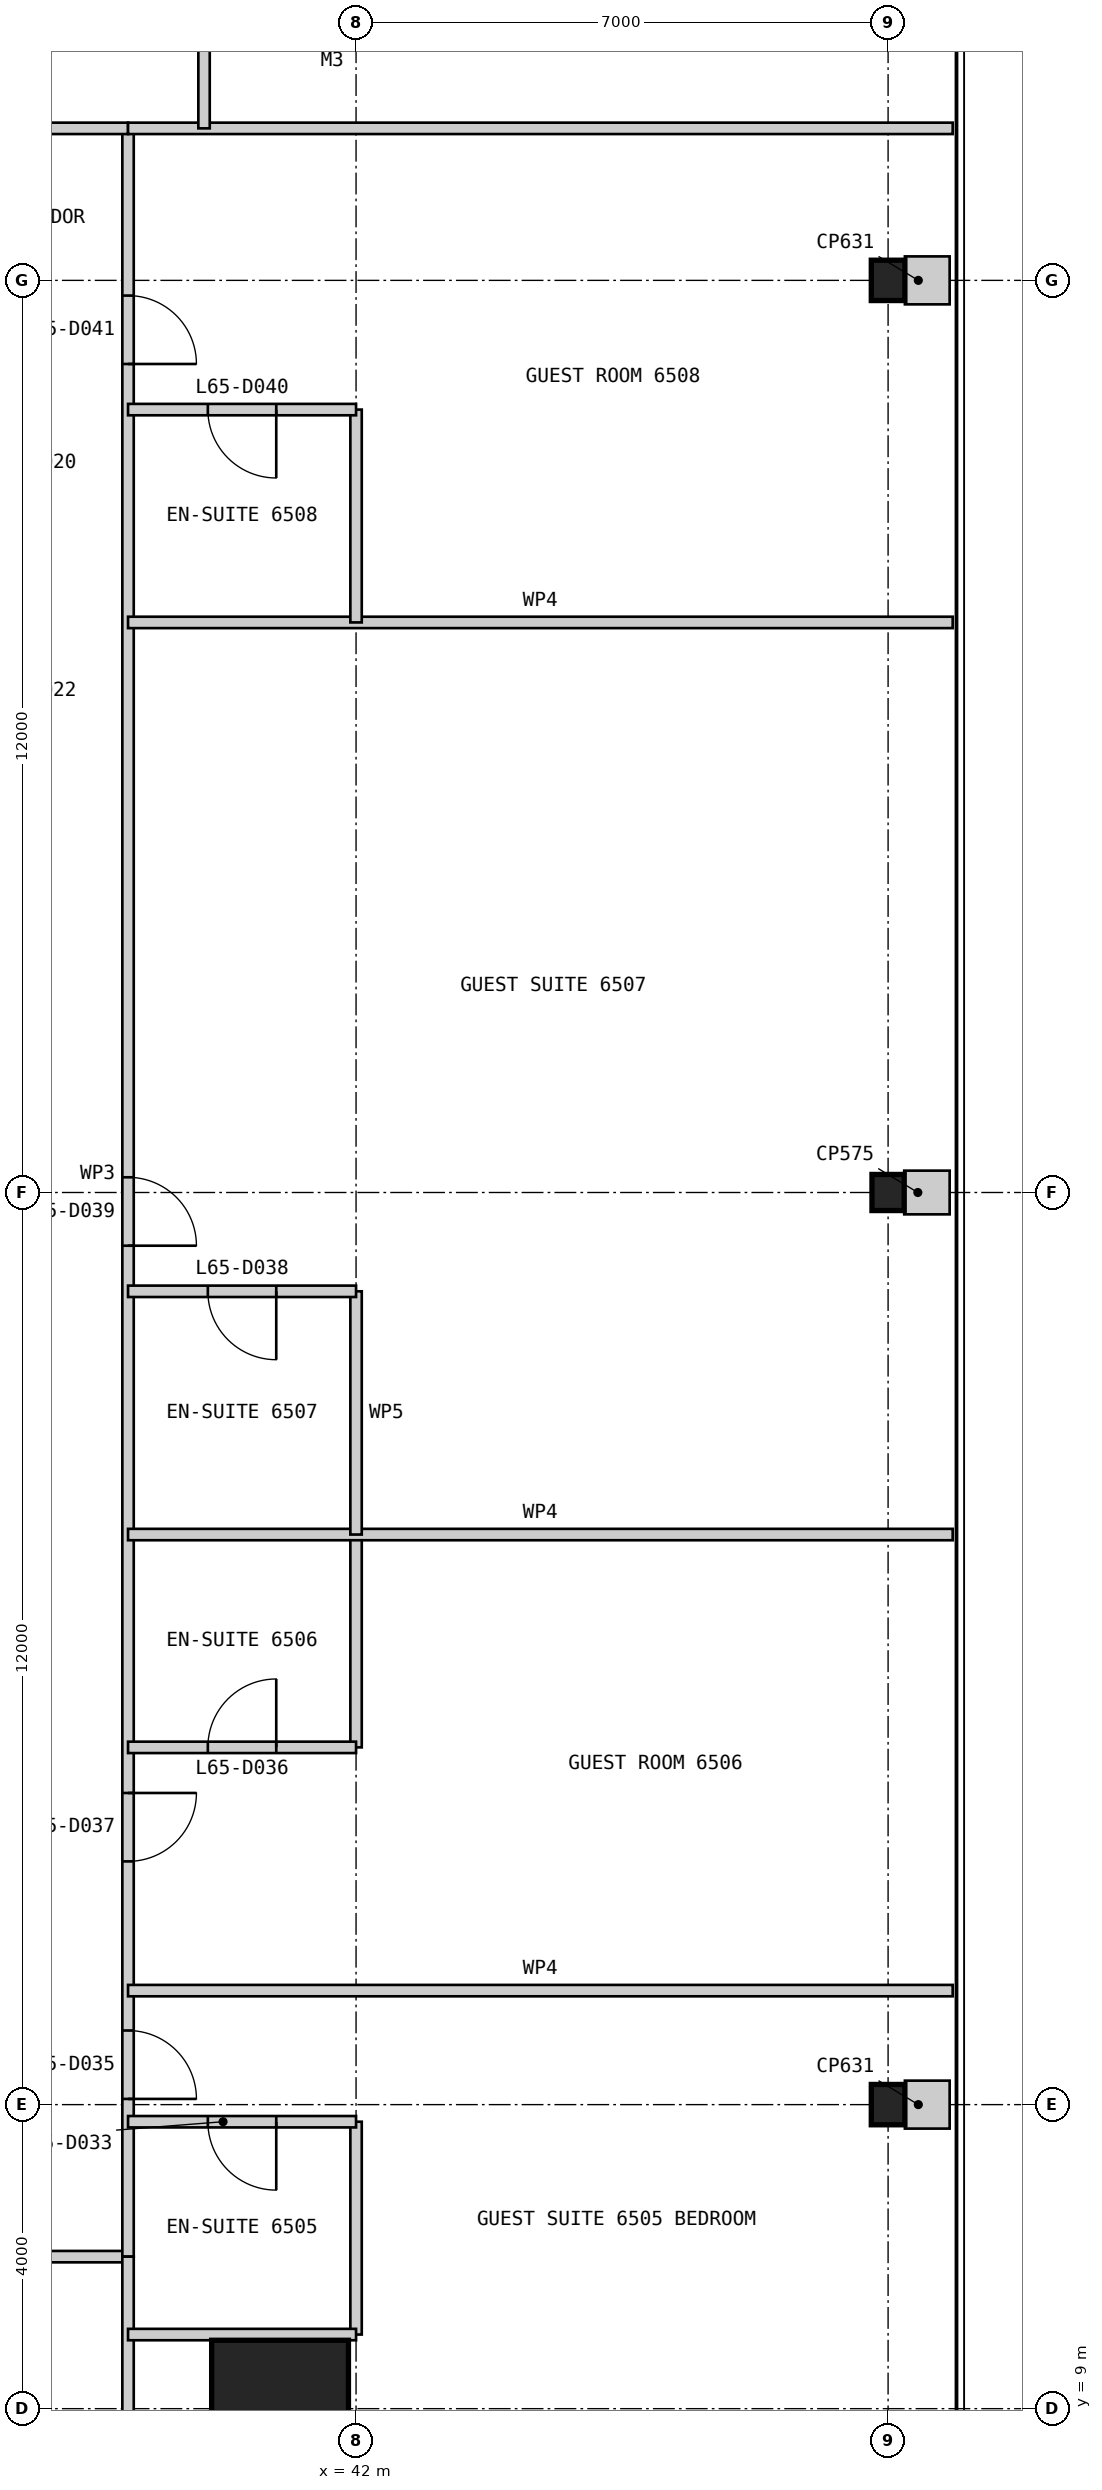
"""IFC4 building model, lengths in metres.
Left out: names, types, materials, properties, quantities, classifications, styles, units other than length and angle.
Written with IfcOpenShell. Run it as: python <this file> out.ifc"""

import sys

from ifc_helpers import new_model, si_unit, direction, frame, frame_2d, origin, origin_2d, place, context, subcontext, project, spatial, rectangle, i_section, extrude, element, fill, save


model = new_model("IFC4")
c1 = context("Model", 3, precision=1e-05, world=origin(), true_north=direction((0.0, 1.0)))
c2 = subcontext(c1, "Body", "Model", "MODEL_VIEW")
j1 = project(units=[si_unit("LENGTHUNIT", "METRE"), si_unit("PLANEANGLEUNIT", "RADIAN")], contexts=[c1])
p1 = place(None, origin())
s1 = spatial("IfcSite", under=j1, at=p1, CompositionType="ELEMENT")
p2 = place(p1, origin())
s2 = spatial("IfcBuilding", under=s1, at=p2, CompositionType="ELEMENT")
p3 = place(p2, frame((0.0, 0.0, 273.0)))
s3 = spatial("IfcBuildingStorey", under=s2, at=p3, CompositionType="ELEMENT", Elevation=273.0)
p4 = place(p3, frame((41.0, 9.0, 0.0), z_axis=(0.0, 0.0, 1.0), x_axis=(1.0, 0.0, 0.0)))
e1 = element("IfcColumn", 1, at=p4, inside=s3, PredefinedType="COLUMN", context=c2, shape_type="SweptSolid", body=[
    extrude(rectangle(XDim=1.8, YDim=1.8, at=origin_2d()), origin(), (0.0, 0.0, 1.0), 3.4),
])
p5 = place(p3, frame((49.0, 13.0, 0.0), z_axis=(0.0, 0.0, 1.0), x_axis=(1.0, 0.0, 0.0)))
e2 = element("IfcColumn", 2, at=p5, inside=s3, PredefinedType="COLUMN", context=c2, shape_type="SweptSolid", body=[
    extrude(i_section(OverallWidth=0.442, OverallDepth=0.531, WebThickness=0.066, FlangeThickness=0.106, at=origin_2d()), origin(), (0.0, 0.0, 1.0), 3.4),
])
p6 = place(p3, frame((49.0, 25.0, 0.0), z_axis=(0.0, 0.0, 1.0), x_axis=(1.0, 0.0, 0.0)))
e3 = element("IfcColumn", 3, at=p6, inside=s3, PredefinedType="COLUMN", context=c2, shape_type="SweptSolid", body=[
    extrude(i_section(OverallWidth=0.424, OverallDepth=0.475, WebThickness=0.048, FlangeThickness=0.077, at=origin_2d()), origin(), (0.0, 0.0, 1.0), 3.4),
])
p7 = place(p3, frame((49.0, 37.0, 0.0), z_axis=(0.0, 0.0, 1.0), x_axis=(1.0, 0.0, 0.0)))
e4 = element("IfcColumn", 4, at=p7, inside=s3, PredefinedType="COLUMN", context=c2, shape_type="SweptSolid", body=[
    extrude(i_section(OverallWidth=0.442, OverallDepth=0.531, WebThickness=0.066, FlangeThickness=0.106, at=origin_2d()), origin(), (0.0, 0.0, 1.0), 3.4),
])
p8 = place(p3, frame((11.0, 11.0, 0.0), z_axis=(0.0, 0.0, 1.0), x_axis=(1.0, 0.0, 0.0)))
e5 = element("IfcWall", 5, at=p8, inside=s3, PredefinedType="PARTITIONING", context=c2, shape_type="SweptSolid", body=[
    extrude(rectangle(XDim=28.0, YDim=0.15, at=frame_2d((14.0, 0.0))), origin(), (0.0, 0.0, 1.0), 2.844),
])
p9 = place(p8, frame((1.9, 0.0, 0.0)))
e6 = element("IfcOpeningElement", 6, at=p9, cuts=e5, PredefinedType="OPENING", context=c2, shape_type="SweptSolid", body=[
    extrude(rectangle(XDim=0.9, YDim=2.1, at=frame_2d((0.45, 1.05))), frame((0.0, 0.085, 0.0), z_axis=(0.0, -1.0, 0.0), x_axis=(1.0, 0.0, 0.0)), (0.0, 0.0, 1.0), 0.17),
])
p10 = place(p8, frame((4.7, 0.0, 0.0)))
e7 = element("IfcOpeningElement", 7, at=p10, cuts=e5, PredefinedType="OPENING", context=c2, shape_type="SweptSolid", body=[
    extrude(rectangle(XDim=1.0, YDim=2.1, at=frame_2d((0.5, 1.05))), frame((0.0, 0.085, 0.0), z_axis=(0.0, -1.0, 0.0), x_axis=(1.0, 0.0, 0.0)), (0.0, 0.0, 1.0), 0.17),
])
p11 = place(p8, frame((13.3, 0.0, 0.0)))
e8 = element("IfcOpeningElement", 8, at=p11, cuts=e5, PredefinedType="OPENING", context=c2, shape_type="SweptSolid", body=[
    extrude(rectangle(XDim=0.9, YDim=2.1, at=frame_2d((0.45, 1.05))), frame((0.0, 0.085, 0.0), z_axis=(0.0, -1.0, 0.0), x_axis=(1.0, 0.0, 0.0)), (0.0, 0.0, 1.0), 0.17),
])
p12 = place(p8, frame((24.9, 0.0, 0.0)))
e9 = element("IfcOpeningElement", 9, at=p12, cuts=e5, PredefinedType="OPENING", context=c2, shape_type="SweptSolid", body=[
    extrude(rectangle(XDim=0.9, YDim=2.1, at=frame_2d((0.45, 1.05))), frame((0.0, 0.085, 0.0), z_axis=(0.0, -1.0, 0.0), x_axis=(1.0, 0.0, 0.0)), (0.0, 0.0, 1.0), 0.17),
])
p13 = place(p3, frame((39.0, 11.0, 0.0), z_axis=(0.0, 0.0, 1.0), x_axis=(0.0, 1.0, 0.0)))
e10 = element("IfcWall", 10, at=p13, inside=s3, PredefinedType="PARTITIONING", context=c2, shape_type="SweptSolid", body=[
    extrude(rectangle(XDim=28.0, YDim=0.15, at=frame_2d((14.0, 0.0))), origin(), (0.0, 0.0, 1.0), 2.844),
])
p14 = place(p13, frame((2.075, 0.0, 0.0)))
e11 = element("IfcOpeningElement", 11, at=p14, cuts=e10, PredefinedType="OPENING", context=c2, shape_type="SweptSolid", body=[
    extrude(rectangle(XDim=0.9, YDim=2.1, at=frame_2d((0.45, 1.05))), frame((0.0, 0.085, 0.0), z_axis=(0.0, -1.0, 0.0), x_axis=(1.0, 0.0, 0.0)), (0.0, 0.0, 1.0), 0.17),
])
p15 = place(p13, frame((5.2, 0.0, 0.0)))
e12 = element("IfcOpeningElement", 12, at=p15, cuts=e10, PredefinedType="OPENING", context=c2, shape_type="SweptSolid", body=[
    extrude(rectangle(XDim=0.9, YDim=2.1, at=frame_2d((0.45, 1.05))), frame((0.0, 0.085, 0.0), z_axis=(0.0, -1.0, 0.0), x_axis=(1.0, 0.0, 0.0)), (0.0, 0.0, 1.0), 0.17),
])
p16 = place(p13, frame((13.3, 0.0, 0.0)))
e13 = element("IfcOpeningElement", 13, at=p16, cuts=e10, PredefinedType="OPENING", context=c2, shape_type="SweptSolid", body=[
    extrude(rectangle(XDim=0.9, YDim=2.1, at=frame_2d((0.45, 1.05))), frame((0.0, 0.085, 0.0), z_axis=(0.0, -1.0, 0.0), x_axis=(1.0, 0.0, 0.0)), (0.0, 0.0, 1.0), 0.17),
])
p17 = place(p13, frame((24.9, 0.0, 0.0)))
e14 = element("IfcOpeningElement", 14, at=p17, cuts=e10, PredefinedType="OPENING", context=c2, shape_type="SweptSolid", body=[
    extrude(rectangle(XDim=0.9, YDim=2.1, at=frame_2d((0.45, 1.05))), frame((0.0, 0.085, 0.0), z_axis=(0.0, -1.0, 0.0), x_axis=(1.0, 0.0, 0.0)), (0.0, 0.0, 1.0), 0.17),
])
p18 = place(p3, frame((39.0, 0.15, 0.0), z_axis=(0.0, 0.0, 1.0), x_axis=(0.0, 1.0, 0.0)))
e15 = element("IfcWall", 15, at=p18, inside=s3, PredefinedType="PARTITIONING", context=c2, shape_type="SweptSolid", body=[
    extrude(rectangle(XDim=10.85, YDim=0.15, at=frame_2d((5.425, 0.0))), origin(), (0.0, 0.0, 1.0), 2.844),
])
p19 = place(p3, frame((42.0, 9.975, 0.0), z_axis=(0.0, 0.0, 1.0), x_axis=(0.0, 1.0, 0.0)))
e16 = element("IfcWall", 16, at=p19, inside=s3, PredefinedType="PARTITIONING", context=c2, shape_type="SweptSolid", body=[
    extrude(rectangle(XDim=2.8, YDim=0.15, at=frame_2d((1.4, 0.0))), origin(), (0.0, 0.0, 1.0), 3.25),
])
p20 = place(p3, frame((42.0, 12.775, 0.0), z_axis=(0.0, 0.0, 1.0), x_axis=(-1.0, 0.0, 0.0)))
e17 = element("IfcWall", 17, at=p20, inside=s3, PredefinedType="PARTITIONING", context=c2, shape_type="SweptSolid", body=[
    extrude(rectangle(XDim=3.0, YDim=0.15, at=frame_2d((1.5, 0.0))), origin(), (0.0, 0.0, 1.0), 3.25),
])
p21 = place(p20, frame((1.05, 0.0, 0.0)))
e18 = element("IfcOpeningElement", 18, at=p21, cuts=e17, PredefinedType="OPENING", context=c2, shape_type="SweptSolid", body=[
    extrude(rectangle(XDim=0.9, YDim=2.1, at=frame_2d((0.45, 1.05))), frame((0.0, 0.085, 0.0), z_axis=(0.0, -1.0, 0.0), x_axis=(1.0, 0.0, 0.0)), (0.0, 0.0, 1.0), 0.17),
])
p22 = place(p3, frame((42.0, 9.975, 0.0), z_axis=(0.0, 0.0, 1.0), x_axis=(-1.0, 0.0, 0.0)))
e19 = element("IfcWall", 19, at=p22, inside=s3, PredefinedType="PARTITIONING", context=c2, shape_type="SweptSolid", body=[
    extrude(rectangle(XDim=3.0, YDim=0.15, at=frame_2d((1.5, 0.0))), origin(), (0.0, 0.0, 1.0), 3.25),
])
p23 = place(p3, frame((49.85, 14.5, 0.0), z_axis=(0.0, 0.0, 1.0), x_axis=(-1.0, 0.0, 0.0)))
e20 = element("IfcWall", 20, at=p23, inside=s3, PredefinedType="PARTITIONING", context=c2, shape_type="SweptSolid", body=[
    extrude(rectangle(XDim=10.85, YDim=0.15, at=frame_2d((5.425, 0.0))), origin(), (0.0, 0.0, 1.0), 3.25),
])
p24 = place(p3, frame((42.0, 17.7, 0.0), z_axis=(0.0, 0.0, 1.0), x_axis=(0.0, 1.0, 0.0)))
e21 = element("IfcWall", 21, at=p24, inside=s3, PredefinedType="PARTITIONING", context=c2, shape_type="SweptSolid", body=[
    extrude(rectangle(XDim=2.8, YDim=0.15, at=frame_2d((1.4, 0.0))), origin(), (0.0, 0.0, 1.0), 3.25),
])
p25 = place(p3, frame((42.0, 17.7, 0.0), z_axis=(0.0, 0.0, 1.0), x_axis=(-1.0, 0.0, 0.0)))
e22 = element("IfcWall", 22, at=p25, inside=s3, PredefinedType="PARTITIONING", context=c2, shape_type="SweptSolid", body=[
    extrude(rectangle(XDim=3.0, YDim=0.15, at=frame_2d((1.5, 0.0))), origin(), (0.0, 0.0, 1.0), 3.25),
])
p26 = place(p25, frame((1.05, 0.0, 0.0)))
e23 = element("IfcOpeningElement", 23, at=p26, cuts=e22, PredefinedType="OPENING", context=c2, shape_type="SweptSolid", body=[
    extrude(rectangle(XDim=0.9, YDim=2.1, at=frame_2d((0.45, 1.05))), frame((0.0, 0.085, 0.0), z_axis=(0.0, -1.0, 0.0), x_axis=(1.0, 0.0, 0.0)), (0.0, 0.0, 1.0), 0.17),
])
p27 = place(p3, frame((49.85, 20.5, 0.0), z_axis=(0.0, 0.0, 1.0), x_axis=(-1.0, 0.0, 0.0)))
e24 = element("IfcWall", 24, at=p27, inside=s3, PredefinedType="PARTITIONING", context=c2, shape_type="SweptSolid", body=[
    extrude(rectangle(XDim=10.85, YDim=0.15, at=frame_2d((5.425, 0.0))), origin(), (0.0, 0.0, 1.0), 3.25),
])
p28 = place(p3, frame((42.0, 20.5, 0.0), z_axis=(0.0, 0.0, 1.0), x_axis=(0.0, 1.0, 0.0)))
e25 = element("IfcWall", 25, at=p28, inside=s3, PredefinedType="PARTITIONING", context=c2, shape_type="SweptSolid", body=[
    extrude(rectangle(XDim=3.2, YDim=0.15, at=frame_2d((1.6, 0.0))), origin(), (0.0, 0.0, 1.0), 3.25),
])
p29 = place(p3, frame((42.0, 23.7, 0.0), z_axis=(0.0, 0.0, 1.0), x_axis=(-1.0, 0.0, 0.0)))
e26 = element("IfcWall", 26, at=p29, inside=s3, PredefinedType="PARTITIONING", context=c2, shape_type="SweptSolid", body=[
    extrude(rectangle(XDim=3.0, YDim=0.15, at=frame_2d((1.5, 0.0))), origin(), (0.0, 0.0, 1.0), 3.25),
])
p30 = place(p29, frame((1.05, 0.0, 0.0)))
e27 = element("IfcOpeningElement", 27, at=p30, cuts=e26, PredefinedType="OPENING", context=c2, shape_type="SweptSolid", body=[
    extrude(rectangle(XDim=0.9, YDim=2.1, at=frame_2d((0.45, 1.05))), frame((0.0, 0.085, 0.0), z_axis=(0.0, -1.0, 0.0), x_axis=(1.0, 0.0, 0.0)), (0.0, 0.0, 1.0), 0.17),
])
p31 = place(p3, frame((49.85, 32.5, 0.0), z_axis=(0.0, 0.0, 1.0), x_axis=(-1.0, 0.0, 0.0)))
e28 = element("IfcWall", 28, at=p31, inside=s3, PredefinedType="PARTITIONING", context=c2, shape_type="SweptSolid", body=[
    extrude(rectangle(XDim=10.85, YDim=0.15, at=frame_2d((5.425, 0.0))), origin(), (0.0, 0.0, 1.0), 3.25),
])
p32 = place(p3, frame((42.0, 32.5, 0.0), z_axis=(0.0, 0.0, 1.0), x_axis=(0.0, 1.0, 0.0)))
e29 = element("IfcWall", 29, at=p32, inside=s3, PredefinedType="PARTITIONING", context=c2, shape_type="SweptSolid", body=[
    extrude(rectangle(XDim=2.8, YDim=0.15, at=frame_2d((1.4, 0.0))), origin(), (0.0, 0.0, 1.0), 3.25),
])
p33 = place(p3, frame((42.0, 35.3, 0.0), z_axis=(0.0, 0.0, 1.0), x_axis=(-1.0, 0.0, 0.0)))
e30 = element("IfcWall", 30, at=p33, inside=s3, PredefinedType="PARTITIONING", context=c2, shape_type="SweptSolid", body=[
    extrude(rectangle(XDim=3.0, YDim=0.15, at=frame_2d((1.5, 0.0))), origin(), (0.0, 0.0, 1.0), 3.25),
])
p34 = place(p33, frame((1.05, 0.0, 0.0)))
e31 = element("IfcOpeningElement", 31, at=p34, cuts=e30, PredefinedType="OPENING", context=c2, shape_type="SweptSolid", body=[
    extrude(rectangle(XDim=0.9, YDim=2.1, at=frame_2d((0.45, 1.05))), frame((0.0, 0.085, 0.0), z_axis=(0.0, -1.0, 0.0), x_axis=(1.0, 0.0, 0.0)), (0.0, 0.0, 1.0), 0.17),
])
p35 = place(p3, frame((39.0, 39.0, 0.0), z_axis=(0.0, 0.0, 1.0), x_axis=(-1.0, 0.0, 0.0)))
e32 = element("IfcWall", 32, at=p35, inside=s3, PredefinedType="PARTITIONING", context=c2, shape_type="SweptSolid", body=[
    extrude(rectangle(XDim=28.0, YDim=0.15, at=frame_2d((14.0, 0.0))), origin(), (0.0, 0.0, 1.0), 2.844),
])
p36 = place(p35, frame((1.9, 0.0, 0.0)))
e33 = element("IfcOpeningElement", 33, at=p36, cuts=e32, PredefinedType="OPENING", context=c2, shape_type="SweptSolid", body=[
    extrude(rectangle(XDim=0.9, YDim=2.1, at=frame_2d((0.45, 1.05))), frame((0.0, 0.085, 0.0), z_axis=(0.0, -1.0, 0.0), x_axis=(1.0, 0.0, 0.0)), (0.0, 0.0, 1.0), 0.17),
])
p37 = place(p35, frame((5.2, 0.0, 0.0)))
e34 = element("IfcOpeningElement", 34, at=p37, cuts=e32, PredefinedType="OPENING", context=c2, shape_type="SweptSolid", body=[
    extrude(rectangle(XDim=0.9, YDim=2.1, at=frame_2d((0.45, 1.05))), frame((0.0, 0.085, 0.0), z_axis=(0.0, -1.0, 0.0), x_axis=(1.0, 0.0, 0.0)), (0.0, 0.0, 1.0), 0.17),
])
p38 = place(p35, frame((13.3, 0.0, 0.0)))
e35 = element("IfcOpeningElement", 35, at=p38, cuts=e32, PredefinedType="OPENING", context=c2, shape_type="SweptSolid", body=[
    extrude(rectangle(XDim=0.9, YDim=2.1, at=frame_2d((0.45, 1.05))), frame((0.0, 0.085, 0.0), z_axis=(0.0, -1.0, 0.0), x_axis=(1.0, 0.0, 0.0)), (0.0, 0.0, 1.0), 0.17),
])
p39 = place(p35, frame((24.9, 0.0, 0.0)))
e36 = element("IfcOpeningElement", 36, at=p39, cuts=e32, PredefinedType="OPENING", context=c2, shape_type="SweptSolid", body=[
    extrude(rectangle(XDim=0.9, YDim=2.1, at=frame_2d((0.45, 1.05))), frame((0.0, 0.085, 0.0), z_axis=(0.0, -1.0, 0.0), x_axis=(1.0, 0.0, 0.0)), (0.0, 0.0, 1.0), 0.17),
])
p40 = place(p3, frame((49.85, 39.0, 0.0), z_axis=(0.0, 0.0, 1.0), x_axis=(-1.0, 0.0, 0.0)))
e37 = element("IfcWall", 37, at=p40, inside=s3, PredefinedType="PARTITIONING", context=c2, shape_type="SweptSolid", body=[
    extrude(rectangle(XDim=10.85, YDim=0.15, at=frame_2d((5.425, 0.0))), origin(), (0.0, 0.0, 1.0), 2.844),
])
p41 = place(p3, frame((40.0, 41.6, 0.0), z_axis=(0.0, 0.0, 1.0), x_axis=(0.0, -1.0, 0.0)))
e38 = element("IfcWall", 38, at=p41, inside=s3, PredefinedType="PARTITIONING", context=c2, shape_type="SweptSolid", body=[
    extrude(rectangle(XDim=2.6, YDim=0.15, at=frame_2d((1.3, 0.0))), origin(), (0.0, 0.0, 1.0), 3.25),
])
p42 = place(p3, frame((49.81, 13.0, 0.0), z_axis=(0.0, 0.0, 1.0), x_axis=(-1.0, 0.0, 0.0)))
e39 = element("IfcWall", 39, at=p42, inside=s3, PredefinedType="PARTITIONING", context=c2, shape_type="SweptSolid", body=[
    extrude(rectangle(XDim=0.589, YDim=0.631, at=frame_2d((0.294, 0.0))), origin(), (0.0, 0.0, 1.0), 3.25),
])
p43 = place(p3, frame((49.81, 25.0, 0.0), z_axis=(0.0, 0.0, 1.0), x_axis=(-1.0, 0.0, 0.0)))
e40 = element("IfcWall", 40, at=p43, inside=s3, PredefinedType="PARTITIONING", context=c2, shape_type="SweptSolid", body=[
    extrude(rectangle(XDim=0.598, YDim=0.575, at=frame_2d((0.299, 0.0))), origin(), (0.0, 0.0, 1.0), 3.25),
])
p44 = place(p3, frame((49.81, 37.0, 0.0), z_axis=(0.0, 0.0, 1.0), x_axis=(-1.0, 0.0, 0.0)))
e41 = element("IfcWall", 41, at=p44, inside=s3, PredefinedType="PARTITIONING", context=c2, shape_type="SweptSolid", body=[
    extrude(rectangle(XDim=0.589, YDim=0.631, at=frame_2d((0.294, 0.0))), origin(), (0.0, 0.0, 1.0), 3.25),
])
p45 = place(p21, origin())
e42 = element("IfcDoor", 42, at=p45, inside=s3, OperationType="SINGLE_SWING_LEFT", PredefinedType="DOOR", context=c2, shape_type="SweptSolid", body=[
    extrude(rectangle(XDim=0.9, YDim=2.1, at=frame_2d((0.45, 1.05))), frame((0.0, 0.025, 0.0), z_axis=(0.0, -1.0, 0.0), x_axis=(1.0, 0.0, 0.0)), (0.0, 0.0, 1.0), 0.05),
])
fill(e18, e42)
p46 = place(p14, frame((0.9, 0.0, 0.0), z_axis=(0.0, 0.0, 1.0), x_axis=(-1.0, 0.0, 0.0)))
e43 = element("IfcDoor", 43, at=p46, inside=s3, OperationType="SINGLE_SWING_RIGHT", PredefinedType="DOOR", context=c2, shape_type="SweptSolid", body=[
    extrude(rectangle(XDim=0.9, YDim=2.1, at=frame_2d((0.45, 1.05))), frame((0.0, 0.025, 0.0), z_axis=(0.0, -1.0, 0.0), x_axis=(1.0, 0.0, 0.0)), (0.0, 0.0, 1.0), 0.05),
])
fill(e11, e43)
p47 = place(p26, frame((0.9, 0.0, 0.0), z_axis=(0.0, 0.0, 1.0), x_axis=(-1.0, 0.0, 0.0)))
e44 = element("IfcDoor", 44, at=p47, inside=s3, OperationType="SINGLE_SWING_RIGHT", PredefinedType="DOOR", context=c2, shape_type="SweptSolid", body=[
    extrude(rectangle(XDim=0.9, YDim=2.1, at=frame_2d((0.45, 1.05))), frame((0.0, 0.025, 0.0), z_axis=(0.0, -1.0, 0.0), x_axis=(1.0, 0.0, 0.0)), (0.0, 0.0, 1.0), 0.05),
])
fill(e23, e44)
p48 = place(p15, frame((0.9, 0.0, 0.0), z_axis=(0.0, 0.0, 1.0), x_axis=(-1.0, 0.0, 0.0)))
e45 = element("IfcDoor", 45, at=p48, inside=s3, OperationType="SINGLE_SWING_LEFT", PredefinedType="DOOR", context=c2, shape_type="SweptSolid", body=[
    extrude(rectangle(XDim=0.9, YDim=2.1, at=frame_2d((0.45, 1.05))), frame((0.0, 0.025, 0.0), z_axis=(0.0, -1.0, 0.0), x_axis=(1.0, 0.0, 0.0)), (0.0, 0.0, 1.0), 0.05),
])
fill(e12, e45)
p49 = place(p30, origin())
e46 = element("IfcDoor", 46, at=p49, inside=s3, OperationType="SINGLE_SWING_LEFT", PredefinedType="DOOR", context=c2, shape_type="SweptSolid", body=[
    extrude(rectangle(XDim=0.9, YDim=2.1, at=frame_2d((0.45, 1.05))), frame((0.0, 0.025, 0.0), z_axis=(0.0, -1.0, 0.0), x_axis=(1.0, 0.0, 0.0)), (0.0, 0.0, 1.0), 0.05),
])
fill(e27, e46)
p50 = place(p16, frame((0.9, 0.0, 0.0), z_axis=(0.0, 0.0, 1.0), x_axis=(-1.0, 0.0, 0.0)))
e47 = element("IfcDoor", 47, at=p50, inside=s3, OperationType="SINGLE_SWING_RIGHT", PredefinedType="DOOR", context=c2, shape_type="SweptSolid", body=[
    extrude(rectangle(XDim=0.9, YDim=2.1, at=frame_2d((0.45, 1.05))), frame((0.0, 0.025, 0.0), z_axis=(0.0, -1.0, 0.0), x_axis=(1.0, 0.0, 0.0)), (0.0, 0.0, 1.0), 0.05),
])
fill(e13, e47)
p51 = place(p34, origin())
e48 = element("IfcDoor", 48, at=p51, inside=s3, OperationType="SINGLE_SWING_LEFT", PredefinedType="DOOR", context=c2, shape_type="SweptSolid", body=[
    extrude(rectangle(XDim=0.9, YDim=2.1, at=frame_2d((0.45, 1.05))), frame((0.0, 0.025, 0.0), z_axis=(0.0, -1.0, 0.0), x_axis=(1.0, 0.0, 0.0)), (0.0, 0.0, 1.0), 0.05),
])
fill(e31, e48)
p52 = place(p17, frame((0.9, 0.0, 0.0), z_axis=(0.0, 0.0, 1.0), x_axis=(-1.0, 0.0, 0.0)))
e49 = element("IfcDoor", 49, at=p52, inside=s3, OperationType="SINGLE_SWING_RIGHT", PredefinedType="DOOR", context=c2, shape_type="SweptSolid", body=[
    extrude(rectangle(XDim=0.9, YDim=2.1, at=frame_2d((0.45, 1.05))), frame((0.0, 0.025, 0.0), z_axis=(0.0, -1.0, 0.0), x_axis=(1.0, 0.0, 0.0)), (0.0, 0.0, 1.0), 0.05),
])
fill(e14, e49)
save(model, sys.argv[1])
